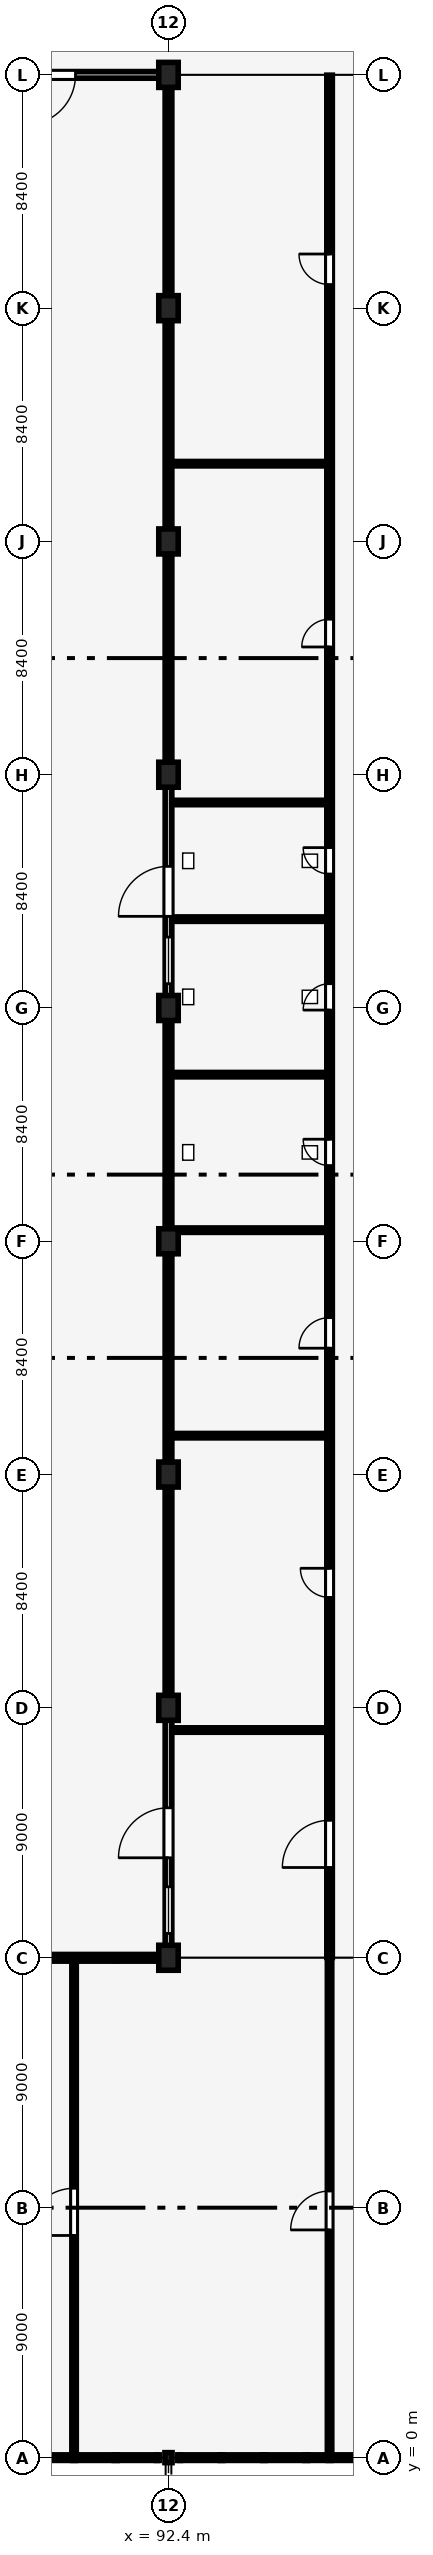
"""IFC4 building model, lengths in metres.
Left out: names, types, materials, properties, quantities, classifications, styles, units other than length and angle.
Written with IfcOpenShell. Run it as: python <this file> out.ifc"""

import sys

from ifc_helpers import new_model, si_unit, direction, frame, frame_2d, origin, origin_2d, place, context, subcontext, project, spatial, rectangle, i_section, extrude, element, fill, save


model = new_model("IFC4")
c1 = context("Model", 3, precision=1e-05, world=origin(), true_north=direction((0.0, 1.0)))
c2 = subcontext(c1, "Body", "Model", "MODEL_VIEW")
j1 = project(units=[si_unit("LENGTHUNIT", "METRE"), si_unit("PLANEANGLEUNIT", "RADIAN")], contexts=[c1])
p1 = place(None, origin())
s1 = spatial("IfcSite", under=j1, at=p1, CompositionType="ELEMENT")
p2 = place(p1, origin())
s2 = spatial("IfcBuilding", under=s1, at=p2, CompositionType="ELEMENT")
p3 = place(p2, origin())
s3 = spatial("IfcBuildingStorey", under=s2, at=p3, CompositionType="ELEMENT", Elevation=0.0)
p4 = place(p3, frame((92.4, 0.0, 0.0), z_axis=(0.0, 0.0, 1.0), x_axis=(1.0, 0.0, 0.0)))
e1 = element("IfcColumn", 1, at=p4, inside=s3, PredefinedType="COLUMN", context=c2, shape_type="SweptSolid", body=[
    extrude(i_section(OverallWidth=0.256, OverallDepth=0.36, WebThickness=0.011, FlangeThickness=0.02, FilletRadius=0.015, at=origin_2d()), origin(), (0.0, 0.0, 1.0), 4.8),
])
for number, where, z_axis, x_axis in (
    (2, (92.4, 18.0, 0.0), (0.0, 0.0, 1.0), (1.0, 0.0, 0.0)),
    (3, (92.4, 27.0, 0.0), (0.0, 0.0, 1.0), (1.0, 0.0, 0.0)),
    (4, (92.4, 35.4, 0.0), (0.0, 0.0, 1.0), (1.0, 0.0, 0.0)),
    (5, (92.4, 43.8, 0.0), (0.0, 0.0, 1.0), (1.0, 0.0, 0.0)),
    (6, (92.4, 52.2, 0.0), (0.0, 0.0, 1.0), (1.0, 0.0, 0.0)),
    (7, (92.4, 60.6, 0.0), (0.0, 0.0, 1.0), (1.0, 0.0, 0.0)),
    (8, (92.4, 69.0, 0.0), (0.0, 0.0, 1.0), (1.0, 0.0, 0.0)),
    (9, (92.4, 77.4, 0.0), (0.0, 0.0, 1.0), (1.0, 0.0, 0.0)),
    (10, (92.4, 85.8, 0.0), (0.0, 0.0, 1.0), (1.0, 0.0, 0.0)),
):
    element("IfcColumn", number, at=place(p3, frame(where, z_axis=z_axis, x_axis=x_axis)), inside=s3, PredefinedType="COLUMN", context=c2, shape_type="SweptSolid", body=[
        extrude(rectangle(XDim=0.7, YDim=0.9, at=origin_2d()), origin(), (0.0, 0.0, 1.0), 4.8),
    ])
p5 = place(p3, frame((84.229, 85.8, 0.0), z_axis=(0.0, 0.0, 1.0), x_axis=(1.0, 0.0, 0.0)))
e11 = element("IfcWall", 11, at=p5, inside=s3, PredefinedType="SOLIDWALL", context=c2, shape_type="SweptSolid", body=[
    extrude(rectangle(XDim=7.846, YDim=0.24, at=frame_2d((3.923, 0.0))), origin(), (0.0, 0.0, 1.0), 3.52),
])
p6 = place(p5, frame((4.823, 0.0, 0.0), z_axis=(0.0, 0.0, 1.0), x_axis=(-1.0, 0.0, 0.0)))
e12 = element("IfcOpeningElement", 12, at=p6, cuts=e11, PredefinedType="OPENING", context=c2, shape_type="SweptSolid", body=[
    extrude(rectangle(XDim=1.8, YDim=2.35, at=frame_2d((0.9, 1.175))), frame((0.0, 0.13, 0.0), z_axis=(0.0, -1.0, 0.0), x_axis=(1.0, 0.0, 0.0)), (0.0, 0.0, 1.0), 0.26),
])
p7 = place(p5, frame((0.45, 0.0, 0.95)))
e13 = element("IfcOpeningElement", 13, at=p7, cuts=e11, PredefinedType="OPENING", context=c2, shape_type="SweptSolid", body=[
    extrude(rectangle(XDim=1.68, YDim=1.8, at=frame_2d((0.84, 0.9))), frame((0.0, 0.13, 0.0), z_axis=(0.0, -1.0, 0.0), x_axis=(1.0, 0.0, 0.0)), (0.0, 0.0, 1.0), 0.26),
])
p8 = place(p3, frame((92.4, 18.425, 0.0), z_axis=(0.0, 0.0, 1.0), x_axis=(0.0, 1.0, 0.0)))
e14 = element("IfcWall", 14, at=p8, inside=s3, PredefinedType="SOLIDWALL", context=c2, shape_type="SweptSolid", body=[
    extrude(rectangle(XDim=8.15, YDim=0.24, at=frame_2d((4.075, 0.0))), origin(), (0.0, 0.0, 1.0), 3.72),
])
p9 = place(p8, frame((3.175, 0.0, 0.0)))
e15 = element("IfcOpeningElement", 15, at=p9, cuts=e14, PredefinedType="OPENING", context=c2, shape_type="SweptSolid", body=[
    extrude(rectangle(XDim=1.8, YDim=2.35, at=frame_2d((0.9, 1.175))), frame((0.0, 0.13, 0.0), z_axis=(0.0, -1.0, 0.0), x_axis=(1.0, 0.0, 0.0)), (0.0, 0.0, 1.0), 0.26),
])
p10 = place(p8, frame((0.45, 0.0, 0.95)))
e16 = element("IfcOpeningElement", 16, at=p10, cuts=e14, PredefinedType="OPENING", context=c2, shape_type="SweptSolid", body=[
    extrude(rectangle(XDim=1.68, YDim=2.1, at=frame_2d((0.84, 1.05))), frame((0.0, 0.13, 0.0), z_axis=(0.0, -1.0, 0.0), x_axis=(1.0, 0.0, 0.0)), (0.0, 0.0, 1.0), 0.26),
])
for number, where, z_axis, x_axis in (
    (17, (92.4, 27.425, 0.0), (0.0, 0.0, 1.0), (0.0, 1.0, 0.0)),
    (18, (92.4, 35.825, 0.0), (0.0, 0.0, 1.0), (0.0, 1.0, 0.0)),
):
    element("IfcWall", number, at=place(p3, frame(where, z_axis=z_axis, x_axis=x_axis)), inside=s3, PredefinedType="SOLIDWALL", context=c2, shape_type="SweptSolid", body=[
        extrude(rectangle(XDim=7.55, YDim=0.24, at=frame_2d((3.775, 0.0))), origin(), (0.0, 0.0, 1.0), 1.15),
    ])
p11 = place(p3, frame((92.4, 44.225, 0.0), z_axis=(0.0, 0.0, 1.0), x_axis=(0.0, 1.0, 0.0)))
e19 = element("IfcWall", 19, at=p11, inside=s3, PredefinedType="SOLIDWALL", context=c2, shape_type="SweptSolid", body=[
    extrude(rectangle(XDim=7.55, YDim=0.24, at=frame_2d((3.775, 0.0))), origin(), (0.0, 0.0, 1.0), 1.15),
])
p12 = place(p3, frame((92.4, 52.625, 0.0), z_axis=(0.0, 0.0, 1.0), x_axis=(0.0, 1.0, 0.0)))
e20 = element("IfcWall", 20, at=p12, inside=s3, PredefinedType="SOLIDWALL", context=c2, shape_type="SweptSolid", body=[
    extrude(rectangle(XDim=7.55, YDim=0.24, at=frame_2d((3.775, 0.0))), origin(), (0.0, 0.0, 1.0), 3.59),
])
p13 = place(p12, frame((2.875, 0.0, 0.0)))
e21 = element("IfcOpeningElement", 21, at=p13, cuts=e20, PredefinedType="OPENING", context=c2, shape_type="SweptSolid", body=[
    extrude(rectangle(XDim=1.8, YDim=2.35, at=frame_2d((0.9, 1.175))), frame((0.0, 0.13, 0.0), z_axis=(0.0, -1.0, 0.0), x_axis=(1.0, 0.0, 0.0)), (0.0, 0.0, 1.0), 0.26),
])
p14 = place(p12, frame((0.45, 0.0, 0.95)))
e22 = element("IfcOpeningElement", 22, at=p14, cuts=e20, PredefinedType="OPENING", context=c2, shape_type="SweptSolid", body=[
    extrude(rectangle(XDim=1.68, YDim=2.1, at=frame_2d((0.84, 1.05))), frame((0.0, 0.13, 0.0), z_axis=(0.0, -1.0, 0.0), x_axis=(1.0, 0.0, 0.0)), (0.0, 0.0, 1.0), 0.26),
])
for number, where, z_axis, x_axis in (
    (23, (92.4, 61.025, 0.0), (0.0, 0.0, 1.0), (0.0, 1.0, 0.0)),
    (24, (92.4, 69.425, 0.0), (0.0, 0.0, 1.0), (0.0, 1.0, 0.0)),
    (25, (92.4, 77.825, 0.0), (0.0, 0.0, 1.0), (0.0, 1.0, 0.0)),
):
    element("IfcWall", number, at=place(p3, frame(where, z_axis=z_axis, x_axis=x_axis)), inside=s3, PredefinedType="SOLIDWALL", context=c2, shape_type="SweptSolid", body=[
        extrude(rectangle(XDim=7.55, YDim=0.24, at=frame_2d((3.775, 0.0))), origin(), (0.0, 0.0, 1.0), 1.15),
    ])
p15 = place(p3, frame((84.127, 18.0, 0.0), z_axis=(0.0, 0.0, 1.0), x_axis=(1.0, 0.0, 0.0)))
e26 = element("IfcWall", 26, at=p15, inside=s3, PredefinedType="SOLIDWALL", context=c2, shape_type="SweptSolid", body=[
    extrude(rectangle(XDim=7.948, YDim=0.24, at=frame_2d((3.974, 0.0))), origin(), (0.0, 0.0, 1.0), 1.1),
])
for number, where, z_axis, x_axis in (
    (27, (92.525, 26.2, 0.0), (0.0, 0.0, 1.0), (1.0, 0.0, 0.0)),
    (28, (92.525, 36.8, 0.0), (0.0, 0.0, 1.0), (1.0, 0.0, 0.0)),
    (29, (92.525, 44.2, 0.0), (0.0, 0.0, 1.0), (1.0, 0.0, 0.0)),
):
    element("IfcWall", number, at=place(p3, frame(where, z_axis=z_axis, x_axis=x_axis)), inside=s3, PredefinedType="PARTITIONING", context=c2, shape_type="SweptSolid", body=[
        extrude(rectangle(XDim=5.57, YDim=0.16, at=frame_2d((2.785, 0.0))), origin(), (0.0, 0.0, 1.0), 4.5),
    ])
for number, where, z_axis, x_axis in (
    (30, (92.525, 49.8, 0.0), (0.0, 0.0, 1.0), (1.0, 0.0, 0.0)),
    (31, (92.525, 55.4, 0.0), (0.0, 0.0, 1.0), (1.0, 0.0, 0.0)),
):
    element("IfcWall", number, at=place(p3, frame(where, z_axis=z_axis, x_axis=x_axis)), inside=s3, PredefinedType="PARTITIONING", context=c2, shape_type="SweptSolid", body=[
        extrude(rectangle(XDim=5.57, YDim=0.16, at=frame_2d((2.785, 0.0))), origin(), (0.0, 0.0, 1.0), 4.06),
    ])
p16 = place(p3, frame((92.525, 59.6, 0.0), z_axis=(0.0, 0.0, 1.0), x_axis=(1.0, 0.0, 0.0)))
e32 = element("IfcWall", 32, at=p16, inside=s3, PredefinedType="PARTITIONING", context=c2, shape_type="SweptSolid", body=[
    extrude(rectangle(XDim=5.57, YDim=0.16, at=frame_2d((2.785, 0.0))), origin(), (0.0, 0.0, 1.0), 4.5),
])
p17 = place(p3, frame((92.525, 71.8, 0.0), z_axis=(0.0, 0.0, 1.0), x_axis=(1.0, 0.0, 0.0)))
e33 = element("IfcWall", 33, at=p17, inside=s3, PredefinedType="PARTITIONING", context=c2, shape_type="SweptSolid", body=[
    extrude(rectangle(XDim=5.57, YDim=0.16, at=frame_2d((2.785, 0.0))), origin(), (0.0, 0.0, 1.0), 4.06),
])
p18 = place(p3, frame((98.2, 18.01, 0.0), z_axis=(0.0, 0.0, 1.0), x_axis=(0.0, 1.0, 0.0)))
e34 = element("IfcWall", 34, at=p18, inside=s3, PredefinedType="PARTITIONING", context=c2, shape_type="SweptSolid", body=[
    extrude(rectangle(XDim=67.78, YDim=0.2, at=frame_2d((33.89, 0.0))), origin(), (0.0, 0.0, 1.0), 4.5),
])
p19 = place(p18, frame((3.24, 0.0, 0.0)))
e35 = element("IfcOpeningElement", 35, at=p19, cuts=e34, PredefinedType="OPENING", context=c2, shape_type="SweptSolid", body=[
    extrude(rectangle(XDim=1.7, YDim=2.25, at=frame_2d((0.85, 1.125))), frame((0.0, 0.11, 0.0), z_axis=(0.0, -1.0, 0.0), x_axis=(1.0, 0.0, 0.0)), (0.0, 0.0, 1.0), 0.22),
])
p20 = place(p18, frame((12.965, 0.0, 0.0)))
e36 = element("IfcOpeningElement", 36, at=p20, cuts=e34, PredefinedType="OPENING", context=c2, shape_type="SweptSolid", body=[
    extrude(rectangle(XDim=1.05, YDim=2.2, at=frame_2d((0.525, 1.1))), frame((0.0, 0.11, 0.0), z_axis=(0.0, -1.0, 0.0), x_axis=(1.0, 0.0, 0.0)), (0.0, 0.0, 1.0), 0.22),
])
p21 = place(p18, frame((21.94, 0.0, 0.0)))
e37 = element("IfcOpeningElement", 37, at=p21, cuts=e34, PredefinedType="OPENING", context=c2, shape_type="SweptSolid", body=[
    extrude(rectangle(XDim=1.1, YDim=2.15, at=frame_2d((0.55, 1.075))), frame((0.0, 0.11, 0.0), z_axis=(0.0, -1.0, 0.0), x_axis=(1.0, 0.0, 0.0)), (0.0, 0.0, 1.0), 0.22),
])
p22 = place(p18, frame((28.515, 0.0, 0.0)))
e38 = element("IfcOpeningElement", 38, at=p22, cuts=e34, PredefinedType="OPENING", context=c2, shape_type="SweptSolid", body=[
    extrude(rectangle(XDim=0.95, YDim=2.2, at=frame_2d((0.475, 1.1))), frame((0.0, 0.11, 0.0), z_axis=(0.0, -1.0, 0.0), x_axis=(1.0, 0.0, 0.0)), (0.0, 0.0, 1.0), 0.22),
])
p23 = place(p18, frame((34.115, 0.0, 0.0)))
e39 = element("IfcOpeningElement", 39, at=p23, cuts=e34, PredefinedType="OPENING", context=c2, shape_type="SweptSolid", body=[
    extrude(rectangle(XDim=0.95, YDim=2.2, at=frame_2d((0.475, 1.1))), frame((0.0, 0.11, 0.0), z_axis=(0.0, -1.0, 0.0), x_axis=(1.0, 0.0, 0.0)), (0.0, 0.0, 1.0), 0.22),
])
p24 = place(p18, frame((39.015, 0.0, 0.0)))
e40 = element("IfcOpeningElement", 40, at=p24, cuts=e34, PredefinedType="OPENING", context=c2, shape_type="SweptSolid", body=[
    extrude(rectangle(XDim=0.95, YDim=2.1, at=frame_2d((0.475, 1.05))), frame((0.0, 0.11, 0.0), z_axis=(0.0, -1.0, 0.0), x_axis=(1.0, 0.0, 0.0)), (0.0, 0.0, 1.0), 0.22),
])
p25 = place(p18, frame((47.19, 0.0, 0.0)))
e41 = element("IfcOpeningElement", 41, at=p25, cuts=e34, PredefinedType="OPENING", context=c2, shape_type="SweptSolid", body=[
    extrude(rectangle(XDim=1.0, YDim=2.25, at=frame_2d((0.5, 1.125))), frame((0.0, 0.11, 0.0), z_axis=(0.0, -1.0, 0.0), x_axis=(1.0, 0.0, 0.0)), (0.0, 0.0, 1.0), 0.22),
])
p26 = place(p18, frame((60.24, 0.0, 0.0)))
e42 = element("IfcOpeningElement", 42, at=p26, cuts=e34, PredefinedType="OPENING", context=c2, shape_type="SweptSolid", body=[
    extrude(rectangle(XDim=1.1, YDim=2.15, at=frame_2d((0.55, 1.075))), frame((0.0, 0.11, 0.0), z_axis=(0.0, -1.0, 0.0), x_axis=(1.0, 0.0, 0.0)), (0.0, 0.0, 1.0), 0.22),
])
p27 = place(p3, frame((89.0, 0.117, 0.0), z_axis=(0.0, 0.0, 1.0), x_axis=(0.0, 1.0, 0.0)))
e43 = element("IfcWall", 43, at=p27, inside=s3, PredefinedType="PARTITIONING", context=c2, shape_type="SweptSolid", body=[
    extrude(rectangle(XDim=17.758, YDim=0.16, at=frame_2d((8.879, 0.0))), origin(), (0.0, 0.0, 1.0), 4.5),
])
p28 = place(p27, frame((7.883, 0.0, 0.0)))
e44 = element("IfcOpeningElement", 44, at=p28, cuts=e43, PredefinedType="OPENING", context=c2, shape_type="SweptSolid", body=[
    extrude(rectangle(XDim=1.7, YDim=2.25, at=frame_2d((0.85, 1.125))), frame((0.0, 0.09, 0.0), z_axis=(0.0, -1.0, 0.0), x_axis=(1.0, 0.0, 0.0)), (0.0, 0.0, 1.0), 0.18),
])
p29 = place(p3, frame((98.2, 0.117, 0.0), z_axis=(0.0, 0.0, 1.0), x_axis=(0.0, 1.0, 0.0)))
e45 = element("IfcWall", 45, at=p29, inside=s3, PredefinedType="PARTITIONING", context=c2, shape_type="SweptSolid", body=[
    extrude(rectangle(XDim=17.873, YDim=0.16, at=frame_2d((8.936, 0.0))), origin(), (0.0, 0.0, 1.0), 4.5),
])
p30 = place(p29, frame((8.083, 0.0, 0.0)))
e46 = element("IfcOpeningElement", 46, at=p30, cuts=e45, PredefinedType="OPENING", context=c2, shape_type="SweptSolid", body=[
    extrude(rectangle(XDim=1.4, YDim=2.2, at=frame_2d((0.7, 1.1))), frame((0.0, 0.09, 0.0), z_axis=(0.0, -1.0, 0.0), x_axis=(1.0, 0.0, 0.0)), (0.0, 0.0, 1.0), 0.18),
])
p31 = place(p6, origin())
e47 = element("IfcDoor", 47, at=p31, inside=s3, OperationType="DOUBLE_DOOR_SINGLE_SWING", PredefinedType="DOOR", context=c2, shape_type="SweptSolid", body=[
    extrude(rectangle(XDim=1.8, YDim=2.35, at=frame_2d((0.9, 1.175))), frame((0.0, 0.025, 0.0), z_axis=(0.0, -1.0, 0.0), x_axis=(1.0, 0.0, 0.0)), (0.0, 0.0, 1.0), 0.05),
])
fill(e12, e47)
p32 = place(p9, origin())
e48 = element("IfcDoor", 48, at=p32, inside=s3, OperationType="DOUBLE_DOOR_SINGLE_SWING", PredefinedType="DOOR", context=c2, shape_type="SweptSolid", body=[
    extrude(rectangle(XDim=1.8, YDim=2.35, at=frame_2d((0.9, 1.175))), frame((0.0, 0.025, 0.0), z_axis=(0.0, -1.0, 0.0), x_axis=(1.0, 0.0, 0.0)), (0.0, 0.0, 1.0), 0.05),
])
fill(e15, e48)
p33 = place(p10, origin())
e49 = element("IfcWindow", 49, at=p33, inside=s3, PartitioningType="SINGLE_PANEL", PredefinedType="WINDOW", context=c2, shape_type="SweptSolid", body=[
    extrude(rectangle(XDim=1.68, YDim=2.1, at=frame_2d((0.84, 1.05))), frame((0.0, 0.03, 0.0), z_axis=(0.0, -1.0, 0.0), x_axis=(1.0, 0.0, 0.0)), (0.0, 0.0, 1.0), 0.06),
])
fill(e16, e49)
p34 = place(p13, origin())
e50 = element("IfcDoor", 50, at=p34, inside=s3, OperationType="DOUBLE_DOOR_SINGLE_SWING", PredefinedType="DOOR", context=c2, shape_type="SweptSolid", body=[
    extrude(rectangle(XDim=1.8, YDim=2.35, at=frame_2d((0.9, 1.175))), frame((0.0, 0.025, 0.0), z_axis=(0.0, -1.0, 0.0), x_axis=(1.0, 0.0, 0.0)), (0.0, 0.0, 1.0), 0.05),
])
fill(e21, e50)
p35 = place(p14, origin())
e51 = element("IfcWindow", 51, at=p35, inside=s3, PartitioningType="SINGLE_PANEL", PredefinedType="WINDOW", context=c2, shape_type="SweptSolid", body=[
    extrude(rectangle(XDim=1.68, YDim=2.1, at=frame_2d((0.84, 1.05))), frame((0.0, 0.03, 0.0), z_axis=(0.0, -1.0, 0.0), x_axis=(1.0, 0.0, 0.0)), (0.0, 0.0, 1.0), 0.06),
])
fill(e22, e51)
p36 = place(p19, origin())
e52 = element("IfcDoor", 52, at=p36, inside=s3, OperationType="DOUBLE_DOOR_SINGLE_SWING", PredefinedType="DOOR", context=c2, shape_type="SweptSolid", body=[
    extrude(rectangle(XDim=1.7, YDim=2.25, at=frame_2d((0.85, 1.125))), frame((0.0, 0.025, 0.0), z_axis=(0.0, -1.0, 0.0), x_axis=(1.0, 0.0, 0.0)), (0.0, 0.0, 1.0), 0.05),
])
fill(e35, e52)
p37 = place(p20, origin())
e53 = element("IfcDoor", 53, at=p37, inside=s3, OperationType="SINGLE_SWING_RIGHT", PredefinedType="DOOR", context=c2, shape_type="SweptSolid", body=[
    extrude(rectangle(XDim=1.05, YDim=2.2, at=frame_2d((0.525, 1.1))), frame((0.0, 0.025, 0.0), z_axis=(0.0, -1.0, 0.0), x_axis=(1.0, 0.0, 0.0)), (0.0, 0.0, 1.0), 0.05),
])
fill(e36, e53)
p38 = place(p21, origin())
e54 = element("IfcDoor", 54, at=p38, inside=s3, OperationType="SINGLE_SWING_LEFT", PredefinedType="DOOR", context=c2, shape_type="SweptSolid", body=[
    extrude(rectangle(XDim=1.1, YDim=2.15, at=frame_2d((0.55, 1.075))), frame((0.0, 0.025, 0.0), z_axis=(0.0, -1.0, 0.0), x_axis=(1.0, 0.0, 0.0)), (0.0, 0.0, 1.0), 0.05),
])
fill(e37, e54)
p39 = place(p22, origin())
e55 = element("IfcDoor", 55, at=p39, inside=s3, OperationType="SINGLE_SWING_RIGHT", PredefinedType="DOOR", context=c2, shape_type="SweptSolid", body=[
    extrude(rectangle(XDim=0.95, YDim=2.2, at=frame_2d((0.475, 1.1))), frame((0.0, 0.025, 0.0), z_axis=(0.0, -1.0, 0.0), x_axis=(1.0, 0.0, 0.0)), (0.0, 0.0, 1.0), 0.05),
])
fill(e38, e55)
p40 = place(p23, origin())
e56 = element("IfcDoor", 56, at=p40, inside=s3, OperationType="SINGLE_SWING_LEFT", PredefinedType="DOOR", context=c2, shape_type="SweptSolid", body=[
    extrude(rectangle(XDim=0.95, YDim=2.2, at=frame_2d((0.475, 1.1))), frame((0.0, 0.025, 0.0), z_axis=(0.0, -1.0, 0.0), x_axis=(1.0, 0.0, 0.0)), (0.0, 0.0, 1.0), 0.05),
])
fill(e39, e56)
p41 = place(p24, origin())
e57 = element("IfcDoor", 57, at=p41, inside=s3, OperationType="SINGLE_SWING_RIGHT", PredefinedType="DOOR", context=c2, shape_type="SweptSolid", body=[
    extrude(rectangle(XDim=0.95, YDim=2.1, at=frame_2d((0.475, 1.05))), frame((0.0, 0.025, 0.0), z_axis=(0.0, -1.0, 0.0), x_axis=(1.0, 0.0, 0.0)), (0.0, 0.0, 1.0), 0.05),
])
fill(e40, e57)
p42 = place(p25, origin())
e58 = element("IfcDoor", 58, at=p42, inside=s3, OperationType="SINGLE_SWING_LEFT", PredefinedType="DOOR", context=c2, shape_type="SweptSolid", body=[
    extrude(rectangle(XDim=1.0, YDim=2.25, at=frame_2d((0.5, 1.125))), frame((0.0, 0.025, 0.0), z_axis=(0.0, -1.0, 0.0), x_axis=(1.0, 0.0, 0.0)), (0.0, 0.0, 1.0), 0.05),
])
fill(e41, e58)
p43 = place(p26, origin())
e59 = element("IfcDoor", 59, at=p43, inside=s3, OperationType="SINGLE_SWING_RIGHT", PredefinedType="DOOR", context=c2, shape_type="SweptSolid", body=[
    extrude(rectangle(XDim=1.1, YDim=2.15, at=frame_2d((0.55, 1.075))), frame((0.0, 0.025, 0.0), z_axis=(0.0, -1.0, 0.0), x_axis=(1.0, 0.0, 0.0)), (0.0, 0.0, 1.0), 0.05),
])
fill(e42, e59)
p44 = place(p28, origin())
e60 = element("IfcDoor", 60, at=p44, inside=s3, OperationType="DOUBLE_DOOR_SINGLE_SWING", PredefinedType="DOOR", context=c2, shape_type="SweptSolid", body=[
    extrude(rectangle(XDim=1.7, YDim=2.25, at=frame_2d((0.85, 1.125))), frame((0.0, 0.025, 0.0), z_axis=(0.0, -1.0, 0.0), x_axis=(1.0, 0.0, 0.0)), (0.0, 0.0, 1.0), 0.05),
])
fill(e44, e60)
p45 = place(p30, origin())
e61 = element("IfcDoor", 61, at=p45, inside=s3, OperationType="DOUBLE_DOOR_SINGLE_SWING", PredefinedType="DOOR", context=c2, shape_type="SweptSolid", body=[
    extrude(rectangle(XDim=1.4, YDim=2.2, at=frame_2d((0.7, 1.1))), frame((0.0, 0.025, 0.0), z_axis=(0.0, -1.0, 0.0), x_axis=(1.0, 0.0, 0.0)), (0.0, 0.0, 1.0), 0.05),
])
fill(e46, e61)
save(model, sys.argv[1])
